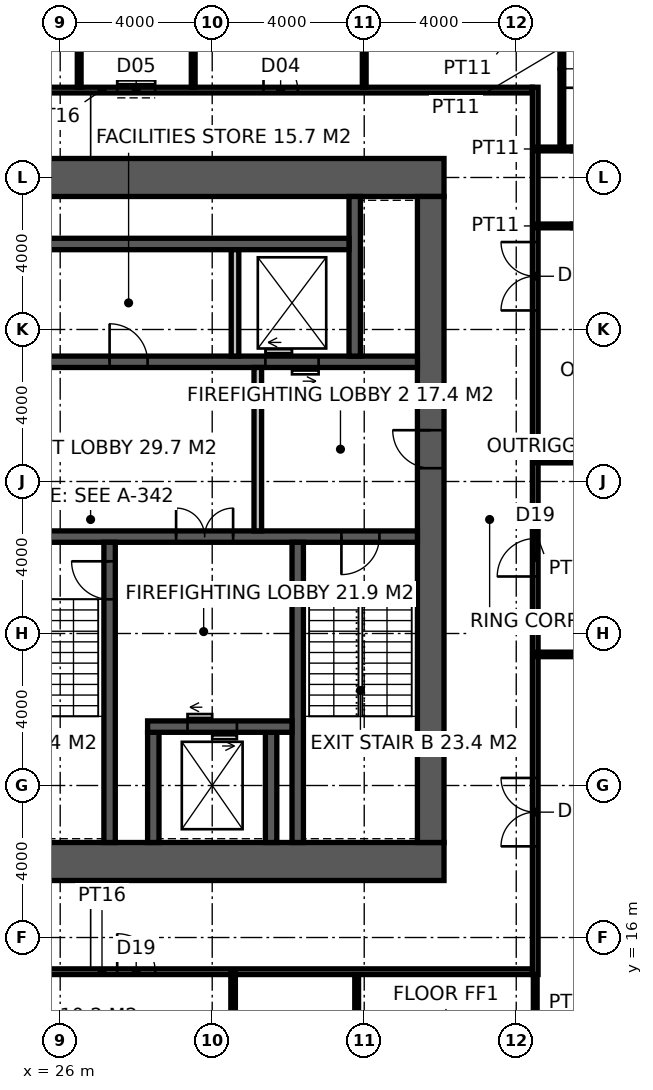
"""IFC4 building model, lengths in metres.
Left out: names, types, materials, properties, quantities, classifications, styles, units other than length and angle.
Written with IfcOpenShell. Run it as: python <this file> out.ifc"""

import sys

from ifc_helpers import new_model, si_unit, direction, frame, frame_2d, origin, place, context, subcontext, project, spatial, rectangle, extrude, element, fill, save


model = new_model("IFC4")
c1 = context("Model", 3, precision=1e-05, world=origin(), true_north=direction((0.0, 1.0)))
c2 = subcontext(c1, "Body", "Model", "MODEL_VIEW")
j1 = project(units=[si_unit("LENGTHUNIT", "METRE"), si_unit("PLANEANGLEUNIT", "RADIAN")], contexts=[c1])
p1 = place(None, origin())
s1 = spatial("IfcSite", under=j1, at=p1, CompositionType="ELEMENT")
p2 = place(p1, origin())
s2 = spatial("IfcBuilding", under=s1, at=p2, CompositionType="ELEMENT")
p3 = place(p2, frame((0.0, 0.0, 270.2)))
s3 = spatial("IfcBuildingStorey", under=s2, at=p3, CompositionType="ELEMENT", Elevation=270.2)
p4 = place(p3, frame((18.5, 18.0, -0.15), z_axis=(0.0, 0.0, 1.0), x_axis=(1.0, 0.0, 0.0)))
e1 = element("IfcWall", 1, at=p4, inside=s3, PredefinedType="SHEAR", context=c2, shape_type="SweptSolid", body=[
    extrude(rectangle(XDim=17.6, YDim=1.0, at=frame_2d((8.8, 0.0))), origin(), (0.0, 0.0, 1.0), 4.0),
])
p5 = place(p4, frame((3.45, 0.0, 0.15)))
e2 = element("IfcOpeningElement", 2, at=p5, cuts=e1, PredefinedType="OPENING", context=c2, shape_type="SweptSolid", body=[
    extrude(rectangle(XDim=1.5, YDim=2.4, at=frame_2d((0.75, 1.2))), frame((0.0, 0.51, 0.0), z_axis=(0.0, -1.0, 0.0), x_axis=(1.0, 0.0, 0.0)), (0.0, 0.0, 1.0), 1.02),
])
p6 = place(p3, frame((18.5, 36.0, -0.15), z_axis=(0.0, 0.0, 1.0), x_axis=(1.0, 0.0, 0.0)))
e3 = element("IfcWall", 3, at=p6, inside=s3, PredefinedType="SHEAR", context=c2, shape_type="SweptSolid", body=[
    extrude(rectangle(XDim=17.6, YDim=1.0, at=frame_2d((8.8, 0.0))), origin(), (0.0, 0.0, 1.0), 4.0),
])
p7 = place(p3, frame((35.75, 18.5, -0.15), z_axis=(0.0, 0.0, 1.0), x_axis=(0.0, 1.0, 0.0)))
e4 = element("IfcWall", 4, at=p7, inside=s3, PredefinedType="SHEAR", context=c2, shape_type="SweptSolid", body=[
    extrude(rectangle(XDim=17.0, YDim=0.7, at=frame_2d((8.5, 0.0))), origin(), (0.0, 0.0, 1.0), 4.0),
])
p8 = place(p7, frame((9.85, 0.0, 0.15)))
e5 = element("IfcOpeningElement", 5, at=p8, cuts=e4, PredefinedType="OPENING", context=c2, shape_type="SweptSolid", body=[
    extrude(rectangle(XDim=1.0, YDim=2.2, at=frame_2d((0.5, 1.1))), frame((0.0, 0.36, 0.0), z_axis=(0.0, -1.0, 0.0), x_axis=(1.0, 0.0, 0.0)), (0.0, 0.0, 1.0), 0.72),
])
p9 = place(p3, frame((24.15, 26.55, -0.15), z_axis=(0.0, 0.0, 1.0), x_axis=(1.0, 0.0, 0.0)))
e6 = element("IfcWall", 6, at=p9, inside=s3, PredefinedType="SHEAR", context=c2, shape_type="SweptSolid", body=[
    extrude(rectangle(XDim=11.25, YDim=0.3, at=frame_2d((5.625, 0.0))), origin(), (0.0, 0.0, 1.0), 4.0),
])
p10 = place(p9, frame((9.25, 0.0, 0.15)))
e7 = element("IfcOpeningElement", 7, at=p10, cuts=e6, PredefinedType="OPENING", context=c2, shape_type="SweptSolid", body=[
    extrude(rectangle(XDim=1.0, YDim=2.2, at=frame_2d((0.5, 1.1))), frame((0.0, 0.16, 0.0), z_axis=(0.0, -1.0, 0.0), x_axis=(1.0, 0.0, 0.0)), (0.0, 0.0, 1.0), 0.32),
])
p11 = place(p9, frame((4.9, 0.0, 0.15)))
e8 = element("IfcOpeningElement", 8, at=p11, cuts=e6, PredefinedType="OPENING", context=c2, shape_type="SweptSolid", body=[
    extrude(rectangle(XDim=1.5, YDim=2.4, at=frame_2d((0.75, 1.2))), frame((0.0, 0.16, 0.0), z_axis=(0.0, -1.0, 0.0), x_axis=(1.0, 0.0, 0.0)), (0.0, 0.0, 1.0), 0.32),
])
p12 = place(p3, frame((27.3, 18.5, -0.15), z_axis=(0.0, 0.0, 1.0), x_axis=(0.0, 1.0, 0.0)))
e9 = element("IfcWall", 9, at=p12, inside=s3, PredefinedType="SHEAR", context=c2, shape_type="SweptSolid", body=[
    extrude(rectangle(XDim=7.9, YDim=0.3, at=frame_2d((3.95, 0.0))), origin(), (0.0, 0.0, 1.0), 4.0),
])
p13 = place(p12, frame((6.4, 0.0, 0.15)))
e10 = element("IfcOpeningElement", 10, at=p13, cuts=e9, PredefinedType="OPENING", context=c2, shape_type="SweptSolid", body=[
    extrude(rectangle(XDim=1.0, YDim=2.2, at=frame_2d((0.5, 1.1))), frame((0.0, 0.16, 0.0), z_axis=(0.0, -1.0, 0.0), x_axis=(1.0, 0.0, 0.0)), (0.0, 0.0, 1.0), 0.32),
])
p14 = place(p3, frame((32.25, 18.5, -0.15), z_axis=(0.0, 0.0, 1.0), x_axis=(0.0, 1.0, 0.0)))
e11 = element("IfcWall", 11, at=p14, inside=s3, PredefinedType="SHEAR", context=c2, shape_type="SweptSolid", body=[
    extrude(rectangle(XDim=7.9, YDim=0.3, at=frame_2d((3.95, 0.0))), origin(), (0.0, 0.0, 1.0), 4.0),
])
for number, where, z_axis, x_axis in (
    (12, (28.45, 18.5, -0.15), (0.0, 0.0, 1.0), (0.0, 1.0, 0.0)),
    (13, (31.55, 18.5, -0.15), (0.0, 0.0, 1.0), (0.0, 1.0, 0.0)),
):
    element("IfcWall", number, at=place(p3, frame(where, z_axis=z_axis, x_axis=x_axis)), inside=s3, PredefinedType="SHEAR", context=c2, shape_type="SweptSolid", body=[
        extrude(rectangle(XDim=2.9, YDim=0.3, at=frame_2d((1.45, 0.0))), origin(), (0.0, 0.0, 1.0), 4.0),
    ])
p15 = place(p3, frame((28.3, 21.55, -0.15), z_axis=(0.0, 0.0, 1.0), x_axis=(1.0, 0.0, 0.0)))
e14 = element("IfcWall", 14, at=p15, inside=s3, PredefinedType="SHEAR", context=c2, shape_type="SweptSolid", body=[
    extrude(rectangle(XDim=3.8, YDim=0.3, at=frame_2d((1.9, 0.0))), origin(), (0.0, 0.0, 1.0), 4.0),
])
p16 = place(p15, frame((1.05, 0.0, 0.15)))
e15 = element("IfcOpeningElement", 15, at=p16, cuts=e14, PredefinedType="OPENING", context=c2, shape_type="SweptSolid", body=[
    extrude(rectangle(XDim=1.3, YDim=2.4, at=frame_2d((0.65, 1.2))), frame((0.0, 0.16, 0.0), z_axis=(0.0, -1.0, 0.0), x_axis=(1.0, 0.0, 0.0)), (0.0, 0.0, 1.0), 0.32),
])
p17 = place(p3, frame((24.15, 31.15, -0.15), z_axis=(0.0, 0.0, 1.0), x_axis=(1.0, 0.0, 0.0)))
e16 = element("IfcWall", 16, at=p17, inside=s3, PredefinedType="SHEAR", context=c2, shape_type="SweptSolid", body=[
    extrude(rectangle(XDim=11.25, YDim=0.3, at=frame_2d((5.625, 0.0))), origin(), (0.0, 0.0, 1.0), 4.0),
])
p18 = place(p17, frame((3.15, 0.0, 0.15)))
e17 = element("IfcOpeningElement", 17, at=p18, cuts=e16, PredefinedType="OPENING", context=c2, shape_type="SweptSolid", body=[
    extrude(rectangle(XDim=1.0, YDim=2.2, at=frame_2d((0.5, 1.1))), frame((0.0, 0.16, 0.0), z_axis=(0.0, -1.0, 0.0), x_axis=(1.0, 0.0, 0.0)), (0.0, 0.0, 1.0), 0.32),
])
p19 = place(p17, frame((7.25, 0.0, 0.15)))
e18 = element("IfcOpeningElement", 18, at=p19, cuts=e16, PredefinedType="OPENING", context=c2, shape_type="SweptSolid", body=[
    extrude(rectangle(XDim=1.4, YDim=2.4, at=frame_2d((0.7, 1.2))), frame((0.0, 0.16, 0.0), z_axis=(0.0, -1.0, 0.0), x_axis=(1.0, 0.0, 0.0)), (0.0, 0.0, 1.0), 0.32),
])
p20 = place(p3, frame((33.75, 31.3, -0.15), z_axis=(0.0, 0.0, 1.0), x_axis=(0.0, 1.0, 0.0)))
e19 = element("IfcWall", 19, at=p20, inside=s3, PredefinedType="SHEAR", context=c2, shape_type="SweptSolid", body=[
    extrude(rectangle(XDim=4.2, YDim=0.3, at=frame_2d((2.1, 0.0))), origin(), (0.0, 0.0, 1.0), 4.0),
])
p21 = place(p3, frame((25.0, 34.25, -0.15), z_axis=(0.0, 0.0, 1.0), x_axis=(1.0, 0.0, 0.0)))
e20 = element("IfcWall", 20, at=p21, inside=s3, PredefinedType="SHEAR", context=c2, shape_type="SweptSolid", body=[
    extrude(rectangle(XDim=8.6, YDim=0.3, at=frame_2d((4.3, 0.0))), origin(), (0.0, 0.0, 1.0), 4.0),
])
p22 = place(p3, frame((30.6, 31.3, -0.15), z_axis=(0.0, 0.0, 1.0), x_axis=(0.0, 1.0, 0.0)))
e21 = element("IfcWall", 21, at=p22, inside=s3, PredefinedType="SOLIDWALL", context=c2, shape_type="SweptSolid", body=[
    extrude(rectangle(XDim=2.8, YDim=0.2, at=frame_2d((1.4, 0.0))), origin(), (0.0, 0.0, 1.0), 4.0),
])
p23 = place(p3, frame((31.2, 26.7, 0.0), z_axis=(0.0, 0.0, 1.0), x_axis=(0.0, 1.0, 0.0)))
e22 = element("IfcWall", 22, at=p23, inside=s3, PredefinedType="SOLIDWALL", context=c2, shape_type="SweptSolid", body=[
    extrude(rectangle(XDim=4.3, YDim=0.2, at=frame_2d((2.15, 0.0))), origin(), (0.0, 0.0, 1.0), 3.85),
])
p24 = place(p3, frame((38.5, 15.025, 0.0), z_axis=(0.0, 0.0, 1.0), x_axis=(0.0, 1.0, 0.0)))
e23 = element("IfcWall", 23, at=p24, inside=s3, PredefinedType="PARTITIONING", context=c2, shape_type="SweptSolid", body=[
    extrude(rectangle(XDim=23.35, YDim=0.15, at=frame_2d((11.675, 0.0))), origin(), (0.0, 0.0, 1.0), 2.85),
])
p25 = place(p24, frame((3.374, 0.0, 0.0)))
e24 = element("IfcOpeningElement", 24, at=p25, cuts=e23, PredefinedType="OPENING", context=c2, shape_type="SweptSolid", body=[
    extrude(rectangle(XDim=1.8, YDim=2.4, at=frame_2d((0.9, 1.2))), frame((0.0, 0.085, 0.0), z_axis=(0.0, -1.0, 0.0), x_axis=(1.0, 0.0, 0.0)), (0.0, 0.0, 1.0), 0.17),
])
p26 = place(p24, frame((17.476, 0.0, 0.0)))
e25 = element("IfcOpeningElement", 25, at=p26, cuts=e23, PredefinedType="OPENING", context=c2, shape_type="SweptSolid", body=[
    extrude(rectangle(XDim=1.8, YDim=2.4, at=frame_2d((0.9, 1.2))), frame((0.0, 0.085, 0.0), z_axis=(0.0, -1.0, 0.0), x_axis=(1.0, 0.0, 0.0)), (0.0, 0.0, 1.0), 0.17),
])
p27 = place(p24, frame((10.475, 0.0, 0.0)))
e26 = element("IfcOpeningElement", 26, at=p27, cuts=e23, PredefinedType="OPENING", context=c2, shape_type="SweptSolid", body=[
    extrude(rectangle(XDim=1.0, YDim=2.2, at=frame_2d((0.5, 1.1))), frame((0.0, 0.085, 0.0), z_axis=(0.0, -1.0, 0.0), x_axis=(1.0, 0.0, 0.0)), (0.0, 0.0, 1.0), 0.17),
])
p28 = place(p3, frame((15.775, 15.1, 0.0), z_axis=(0.0, 0.0, 1.0), x_axis=(1.0, 0.0, 0.0)))
e27 = element("IfcWall", 27, at=p28, inside=s3, PredefinedType="PARTITIONING", context=c2, shape_type="SweptSolid", body=[
    extrude(rectangle(XDim=22.65, YDim=0.15, at=frame_2d((11.325, 0.0))), origin(), (0.0, 0.0, 1.0), 3.85),
])
p29 = place(p28, frame((11.725, 0.0, 0.0)))
e28 = element("IfcOpeningElement", 28, at=p29, cuts=e27, PredefinedType="OPENING", context=c2, shape_type="SweptSolid", body=[
    extrude(rectangle(XDim=1.0, YDim=2.2, at=frame_2d((0.5, 1.1))), frame((0.0, 0.085, 0.0), z_axis=(0.0, -1.0, 0.0), x_axis=(1.0, 0.0, 0.0)), (0.0, 0.0, 1.0), 0.17),
])
p30 = place(p3, frame((15.775, 38.3, 0.0), z_axis=(0.0, 0.0, 1.0), x_axis=(1.0, 0.0, 0.0)))
e29 = element("IfcWall", 29, at=p30, inside=s3, PredefinedType="PARTITIONING", context=c2, shape_type="SweptSolid", body=[
    extrude(rectangle(XDim=22.65, YDim=0.15, at=frame_2d((11.325, 0.0))), origin(), (0.0, 0.0, 1.0), 3.85),
])
p31 = place(p30, frame((7.975, 0.0, 0.0)))
e30 = element("IfcOpeningElement", 30, at=p31, cuts=e29, PredefinedType="OPENING", context=c2, shape_type="SweptSolid", body=[
    extrude(rectangle(XDim=0.9, YDim=2.1, at=frame_2d((0.45, 1.05))), frame((0.0, 0.085, 0.0), z_axis=(0.0, -1.0, 0.0), x_axis=(1.0, 0.0, 0.0)), (0.0, 0.0, 1.0), 0.17),
])
p32 = place(p30, frame((11.725, 0.0, 0.0)))
e31 = element("IfcOpeningElement", 31, at=p32, cuts=e29, PredefinedType="OPENING", context=c2, shape_type="SweptSolid", body=[
    extrude(rectangle(XDim=1.0, YDim=2.1, at=frame_2d((0.5, 1.05))), frame((0.0, 0.085, 0.0), z_axis=(0.0, -1.0, 0.0), x_axis=(1.0, 0.0, 0.0)), (0.0, 0.0, 1.0), 0.17),
])
p33 = place(p30, frame((15.575, 0.0, 0.0)))
e32 = element("IfcOpeningElement", 32, at=p33, cuts=e29, PredefinedType="OPENING", context=c2, shape_type="SweptSolid", body=[
    extrude(rectangle(XDim=0.9, YDim=2.1, at=frame_2d((0.45, 1.05))), frame((0.0, 0.085, 0.0), z_axis=(0.0, -1.0, 0.0), x_axis=(1.0, 0.0, 0.0)), (0.0, 0.0, 1.0), 0.17),
])
p34 = place(p3, frame((34.0, 38.375, 0.0), z_axis=(0.0, 0.0, 1.0), x_axis=(0.0, 1.0, 0.0)))
e33 = element("IfcWall", 33, at=p34, inside=s3, PredefinedType="PARTITIONING", context=c2, shape_type="SweptSolid", body=[
    extrude(rectangle(XDim=3.675, YDim=0.1, at=frame_2d((1.837, 0.0))), origin(), (0.0, 0.0, 1.0), 2.85),
])
for number, where, z_axis, x_axis in (
    (34, (26.5, 38.375, 0.0), (0.0, 0.0, 1.0), (0.0, 1.0, 0.0)),
    (35, (29.5, 38.375, 0.0), (0.0, 0.0, 1.0), (0.0, 1.0, 0.0)),
):
    element("IfcWall", number, at=place(p3, frame(where, z_axis=z_axis, x_axis=x_axis)), inside=s3, PredefinedType="PARTITIONING", context=c2, shape_type="SweptSolid", body=[
        extrude(rectangle(XDim=3.575, YDim=0.1, at=frame_2d((1.788, 0.0))), origin(), (0.0, 0.0, 1.0), 2.65),
    ])
p35 = place(p3, frame((30.55, 4.68, 0.0), z_axis=(0.0, 0.0, 1.0), x_axis=(0.0, 1.0, 0.0)))
e36 = element("IfcWall", 36, at=p35, inside=s3, PredefinedType="PARTITIONING", context=c2, shape_type="SweptSolid", body=[
    extrude(rectangle(XDim=10.42, YDim=0.12, at=frame_2d((5.21, 0.0))), origin(), (0.0, 0.0, 1.0), 2.65),
])
for number, where, z_axis, x_axis in (
    (37, (38.5, 23.45, 0.0), (0.0, 0.0, 1.0), (1.0, 0.0, 0.0)),
    (38, (38.5, 28.55, 0.0), (0.0, 0.0, 1.0), (1.0, 0.0, 0.0)),
):
    element("IfcWall", number, at=place(p3, frame(where, z_axis=z_axis, x_axis=x_axis)), inside=s3, PredefinedType="PARTITIONING", context=c2, shape_type="SweptSolid", body=[
        extrude(rectangle(XDim=6.82, YDim=0.12, at=frame_2d((3.41, 0.0))), origin(), (0.0, 0.0, 1.0), 2.65),
    ])
for number, where, z_axis, x_axis in (
    (39, (33.801, 11.55, 0.0), (0.0, 0.0, 1.0), (0.0, 1.0, 0.0)),
    (40, (38.5, 11.55, 0.0), (0.0, 0.0, 1.0), (0.0, 1.0, 0.0)),
):
    element("IfcWall", number, at=place(p3, frame(where, z_axis=z_axis, x_axis=x_axis)), inside=s3, PredefinedType="PARTITIONING", context=c2, shape_type="SweptSolid", body=[
        extrude(rectangle(XDim=3.475, YDim=0.1, at=frame_2d((1.737, 0.0))), origin(), (0.0, 0.0, 1.0), 3.85),
    ])
p36 = place(p3, frame((41.67, 34.725, 0.0), z_axis=(0.0, 0.0, 1.0), x_axis=(-1.0, 0.0, 0.0)))
e41 = element("IfcWall", 41, at=p36, inside=s3, PredefinedType="PARTITIONING", context=c2, shape_type="SweptSolid", body=[
    extrude(rectangle(XDim=3.17, YDim=0.1, at=frame_2d((1.585, 0.0))), origin(), (0.0, 0.0, 1.0), 3.85),
])
p37 = place(p36, frame((1.085, 0.0, 0.0)))
e42 = element("IfcOpeningElement", 42, at=p37, cuts=e41, PredefinedType="OPENING", context=c2, shape_type="SweptSolid", body=[
    extrude(rectangle(XDim=1.0, YDim=2.2, at=frame_2d((0.5, 1.1))), frame((0.0, 0.06, 0.0), z_axis=(0.0, -1.0, 0.0), x_axis=(1.0, 0.0, 0.0)), (0.0, 0.0, 1.0), 0.12),
])
p38 = place(p3, frame((41.67, 36.75, 0.0), z_axis=(0.0, 0.0, 1.0), x_axis=(-1.0, 0.0, 0.0)))
e43 = element("IfcWall", 43, at=p38, inside=s3, PredefinedType="PARTITIONING", context=c2, shape_type="SweptSolid", body=[
    extrude(rectangle(XDim=3.17, YDim=0.1, at=frame_2d((1.585, 0.0))), origin(), (0.0, 0.0, 1.0), 3.85),
])
p39 = place(p38, frame((1.085, 0.0, 0.0)))
e44 = element("IfcOpeningElement", 44, at=p39, cuts=e43, PredefinedType="OPENING", context=c2, shape_type="SweptSolid", body=[
    extrude(rectangle(XDim=1.0, YDim=2.2, at=frame_2d((0.5, 1.1))), frame((0.0, 0.06, 0.0), z_axis=(0.0, -1.0, 0.0), x_axis=(1.0, 0.0, 0.0)), (0.0, 0.0, 1.0), 0.12),
])
p40 = place(p3, frame((39.2, 39.67, 0.0), z_axis=(0.0, 0.0, 1.0), x_axis=(0.0, -1.0, 0.0)))
e45 = element("IfcWall", 45, at=p40, inside=s3, PredefinedType="PARTITIONING", context=c2, shape_type="SweptSolid", body=[
    extrude(rectangle(XDim=2.92, YDim=0.1, at=frame_2d((1.46, 0.0))), origin(), (0.0, 0.0, 1.0), 3.85),
])
p41 = place(p40, frame((0.31, 0.0, 0.0)))
e46 = element("IfcOpeningElement", 46, at=p41, cuts=e45, PredefinedType="OPENING", context=c2, shape_type="SweptSolid", body=[
    extrude(rectangle(XDim=1.0, YDim=2.2, at=frame_2d((0.5, 1.1))), frame((0.0, 0.06, 0.0), z_axis=(0.0, -1.0, 0.0), x_axis=(1.0, 0.0, 0.0)), (0.0, 0.0, 1.0), 0.12),
])
p42 = place(p13, origin())
e47 = element("IfcDoor", 47, at=p42, inside=s3, OperationType="SINGLE_SWING_RIGHT", PredefinedType="DOOR", context=c2, shape_type="SweptSolid", body=[
    extrude(rectangle(XDim=1.0, YDim=2.2, at=frame_2d((0.5, 1.1))), frame((0.0, 0.025, 0.0), z_axis=(0.0, -1.0, 0.0), x_axis=(1.0, 0.0, 0.0)), (0.0, 0.0, 1.0), 0.05),
])
fill(e10, e47)
p43 = place(p10, frame((1.0, 0.0, 0.0), z_axis=(0.0, 0.0, 1.0), x_axis=(-1.0, 0.0, 0.0)))
e48 = element("IfcDoor", 48, at=p43, inside=s3, OperationType="SINGLE_SWING_RIGHT", PredefinedType="DOOR", context=c2, shape_type="SweptSolid", body=[
    extrude(rectangle(XDim=1.0, YDim=2.2, at=frame_2d((0.5, 1.1))), frame((0.0, 0.025, 0.0), z_axis=(0.0, -1.0, 0.0), x_axis=(1.0, 0.0, 0.0)), (0.0, 0.0, 1.0), 0.05),
])
fill(e7, e48)
p44 = place(p8, origin())
e49 = element("IfcDoor", 49, at=p44, inside=s3, OperationType="SINGLE_SWING_RIGHT", PredefinedType="DOOR", context=c2, shape_type="SweptSolid", body=[
    extrude(rectangle(XDim=1.0, YDim=2.2, at=frame_2d((0.5, 1.1))), frame((0.0, 0.025, 0.0), z_axis=(0.0, -1.0, 0.0), x_axis=(1.0, 0.0, 0.0)), (0.0, 0.0, 1.0), 0.05),
])
fill(e5, e49)
p45 = place(p11, origin())
e50 = element("IfcDoor", 50, at=p45, inside=s3, OperationType="DOUBLE_DOOR_DOUBLE_SWING", PredefinedType="DOOR", context=c2, shape_type="SweptSolid", body=[
    extrude(rectangle(XDim=1.5, YDim=2.4, at=frame_2d((0.75, 1.2))), frame((0.0, 0.025, 0.0), z_axis=(0.0, -1.0, 0.0), x_axis=(1.0, 0.0, 0.0)), (0.0, 0.0, 1.0), 0.05),
])
fill(e8, e50)
p46 = place(p18, origin())
e51 = element("IfcDoor", 51, at=p46, inside=s3, OperationType="SINGLE_SWING_LEFT", PredefinedType="DOOR", context=c2, shape_type="SweptSolid", body=[
    extrude(rectangle(XDim=1.0, YDim=2.2, at=frame_2d((0.5, 1.1))), frame((0.0, 0.025, 0.0), z_axis=(0.0, -1.0, 0.0), x_axis=(1.0, 0.0, 0.0)), (0.0, 0.0, 1.0), 0.05),
])
fill(e17, e51)
p47 = place(p32, origin())
e52 = element("IfcDoor", 52, at=p47, inside=s3, OperationType="SLIDING_TO_LEFT", PredefinedType="DOOR", context=c2, shape_type="SweptSolid", body=[
    extrude(rectangle(XDim=1.0, YDim=2.1, at=frame_2d((0.5, 1.05))), frame((0.0, 0.025, 0.0), z_axis=(0.0, -1.0, 0.0), x_axis=(1.0, 0.0, 0.0)), (0.0, 0.0, 1.0), 0.05),
])
fill(e31, e52)
p48 = place(p33, origin())
e53 = element("IfcDoor", 53, at=p48, inside=s3, OperationType="SINGLE_SWING_LEFT", PredefinedType="DOOR", context=c2, shape_type="SweptSolid", body=[
    extrude(rectangle(XDim=0.9, YDim=2.1, at=frame_2d((0.45, 1.05))), frame((0.0, 0.025, 0.0), z_axis=(0.0, -1.0, 0.0), x_axis=(1.0, 0.0, 0.0)), (0.0, 0.0, 1.0), 0.05),
])
fill(e32, e53)
p49 = place(p25, origin())
e54 = element("IfcDoor", 54, at=p49, inside=s3, OperationType="DOUBLE_DOOR_DOUBLE_SWING", PredefinedType="DOOR", context=c2, shape_type="SweptSolid", body=[
    extrude(rectangle(XDim=1.8, YDim=2.4, at=frame_2d((0.9, 1.2))), frame((0.0, 0.025, 0.0), z_axis=(0.0, -1.0, 0.0), x_axis=(1.0, 0.0, 0.0)), (0.0, 0.0, 1.0), 0.05),
])
fill(e24, e54)
p50 = place(p26, origin())
e55 = element("IfcDoor", 55, at=p50, inside=s3, OperationType="DOUBLE_DOOR_DOUBLE_SWING", PredefinedType="DOOR", context=c2, shape_type="SweptSolid", body=[
    extrude(rectangle(XDim=1.8, YDim=2.4, at=frame_2d((0.9, 1.2))), frame((0.0, 0.025, 0.0), z_axis=(0.0, -1.0, 0.0), x_axis=(1.0, 0.0, 0.0)), (0.0, 0.0, 1.0), 0.05),
])
fill(e25, e55)
p51 = place(p29, origin())
e56 = element("IfcDoor", 56, at=p51, inside=s3, OperationType="SINGLE_SWING_LEFT", PredefinedType="DOOR", context=c2, shape_type="SweptSolid", body=[
    extrude(rectangle(XDim=1.0, YDim=2.2, at=frame_2d((0.5, 1.1))), frame((0.0, 0.025, 0.0), z_axis=(0.0, -1.0, 0.0), x_axis=(1.0, 0.0, 0.0)), (0.0, 0.0, 1.0), 0.05),
])
fill(e28, e56)
p52 = place(p27, origin())
e57 = element("IfcDoor", 57, at=p52, inside=s3, OperationType="SINGLE_SWING_LEFT", PredefinedType="DOOR", context=c2, shape_type="SweptSolid", body=[
    extrude(rectangle(XDim=1.0, YDim=2.2, at=frame_2d((0.5, 1.1))), frame((0.0, 0.025, 0.0), z_axis=(0.0, -1.0, 0.0), x_axis=(1.0, 0.0, 0.0)), (0.0, 0.0, 1.0), 0.05),
])
fill(e26, e57)
p53 = place(p41, origin())
e58 = element("IfcDoor", 58, at=p53, inside=s3, OperationType="SINGLE_SWING_RIGHT", PredefinedType="DOOR", context=c2, shape_type="SweptSolid", body=[
    extrude(rectangle(XDim=1.0, YDim=2.2, at=frame_2d((0.5, 1.1))), frame((0.0, 0.025, 0.0), z_axis=(0.0, -1.0, 0.0), x_axis=(1.0, 0.0, 0.0)), (0.0, 0.0, 1.0), 0.05),
])
fill(e46, e58)
p54 = place(p16, origin())
e59 = element("IfcDoor", 59, at=p54, inside=s3, OperationType="DOUBLE_DOOR_SLIDING", PredefinedType="DOOR", context=c2, shape_type="SweptSolid", body=[
    extrude(rectangle(XDim=1.3, YDim=2.4, at=frame_2d((0.65, 1.2))), frame((0.0, 0.025, 0.0), z_axis=(0.0, -1.0, 0.0), x_axis=(1.0, 0.0, 0.0)), (0.0, 0.0, 1.0), 0.05),
])
fill(e15, e59)
p55 = place(p19, origin())
e60 = element("IfcDoor", 60, at=p55, inside=s3, OperationType="DOUBLE_DOOR_SLIDING", PredefinedType="DOOR", context=c2, shape_type="SweptSolid", body=[
    extrude(rectangle(XDim=1.4, YDim=2.4, at=frame_2d((0.7, 1.2))), frame((0.0, 0.025, 0.0), z_axis=(0.0, -1.0, 0.0), x_axis=(1.0, 0.0, 0.0)), (0.0, 0.0, 1.0), 0.05),
])
fill(e18, e60)
save(model, sys.argv[1])
